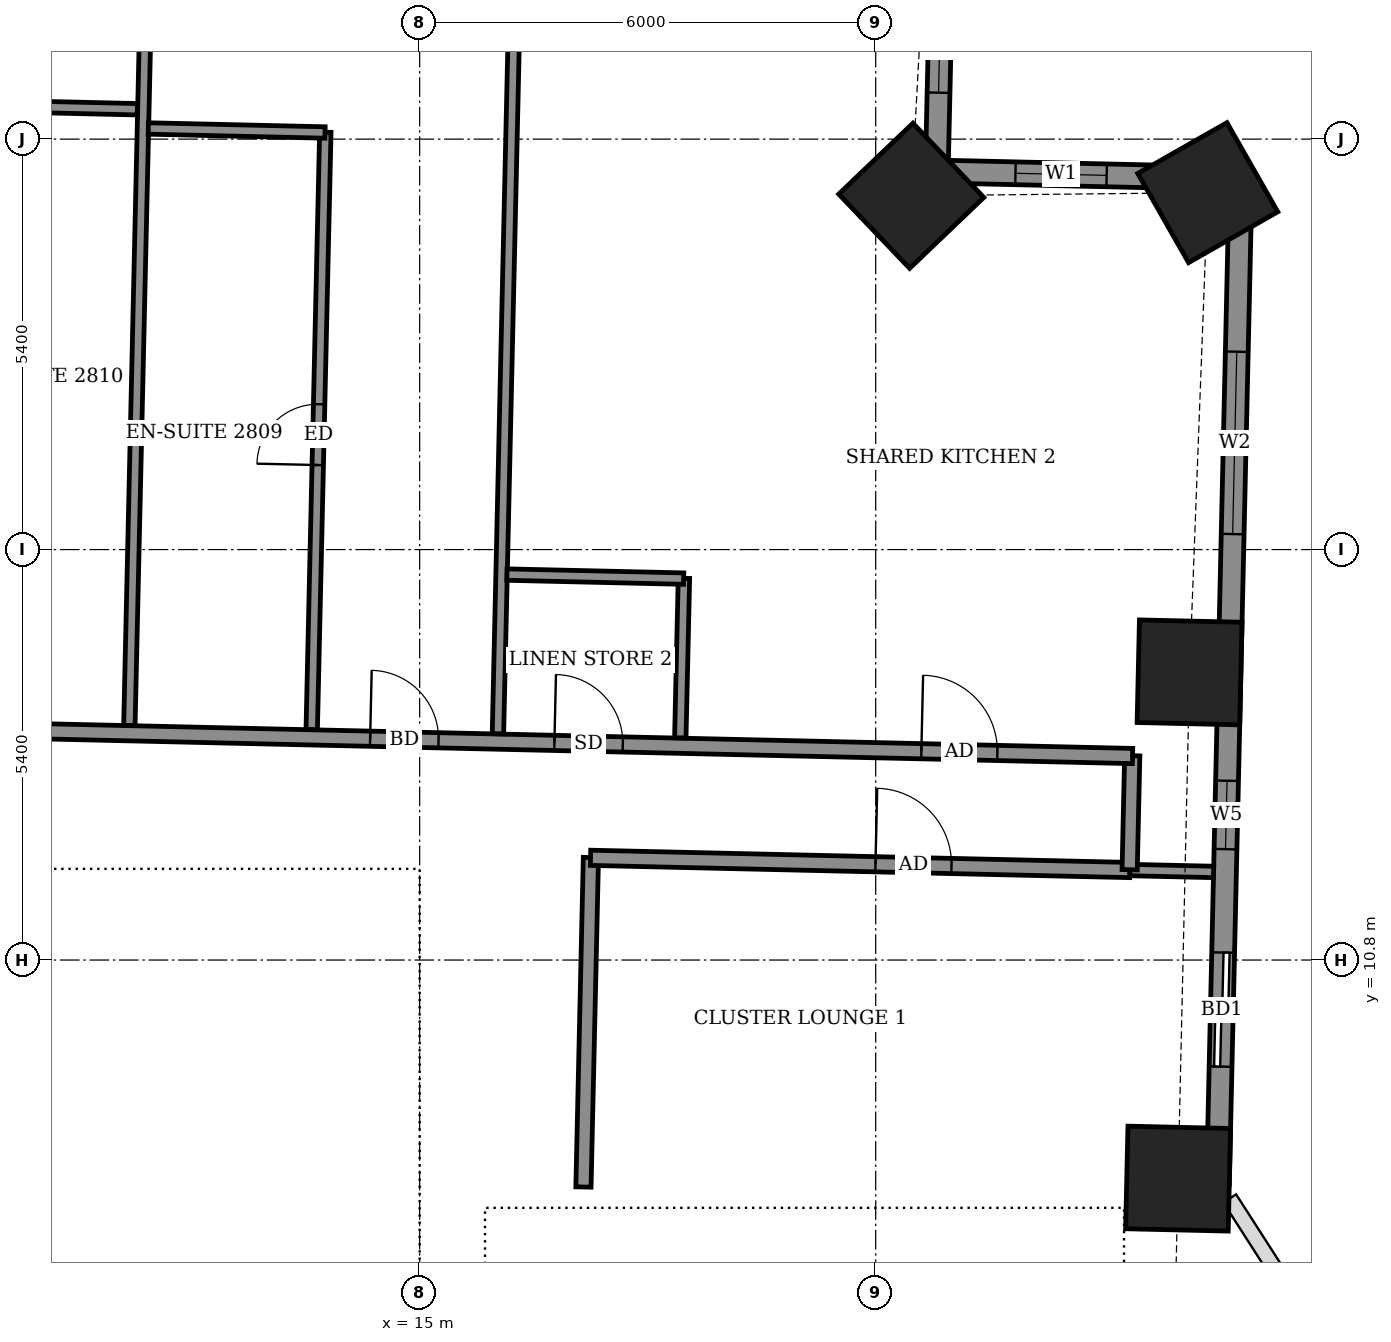
"""IFC4 building model, lengths in metres.
Left out: names, types, materials, properties, quantities, classifications, styles, units other than length and angle.
Written with IfcOpenShell. Run it as: python <this file> out.ifc"""

import sys

from ifc_helpers import new_model, si_unit, direction, frame, frame_2d, origin, origin_2d, place, context, subcontext, project, spatial, rectangle, extrude, element, fill, save


model = new_model("IFC4")
c1 = context("Model", 3, precision=1e-05, world=origin(), true_north=direction((0.0, 1.0)))
c2 = subcontext(c1, "Body", "Model", "MODEL_VIEW")
j1 = project(units=[si_unit("LENGTHUNIT", "METRE"), si_unit("PLANEANGLEUNIT", "RADIAN")], contexts=[c1])
p1 = place(None, origin())
s1 = spatial("IfcSite", under=j1, at=p1, CompositionType="ELEMENT")
p2 = place(p1, origin())
s2 = spatial("IfcBuilding", under=s1, at=p2, CompositionType="ELEMENT")
p3 = place(p2, frame((0.0, 0.0, 112.7)))
s3 = spatial("IfcBuildingStorey", under=s2, at=p3, CompositionType="ELEMENT", Elevation=112.7)
for number, where, z_axis, x_axis in (
    (1, (24.978, 7.924, -0.55), (0.0, 0.0, 1.0), (0.023, 1.0, 0.0)),
    (2, (25.129, 14.584, -0.55), (0.0, 0.0, 1.0), (0.023, 1.0, 0.0)),
    (3, (25.369, 20.896, -0.55), (0.0, 0.0, 1.0), (-0.495, 0.869, 0.0)),
    (4, (21.468, 20.855, -0.55), (0.0, 0.0, 1.0), (-0.691, 0.723, 0.0)),
):
    element("IfcColumn", number, at=place(p3, frame(where, z_axis=z_axis, x_axis=x_axis)), inside=s3, PredefinedType="COLUMN", context=c2, shape_type="SweptSolid", body=[
        extrude(rectangle(XDim=1.35, YDim=1.35, at=origin_2d()), origin(), (0.0, 0.0, 1.0), 3.6),
    ])
p4 = place(p3, frame((25.502, 7.857, 0.0), z_axis=(0.0, 0.0, 1.0), x_axis=(0.022680323815, 0.999742768372, 0.0)))
e5 = element("IfcWall", 5, at=p4, inside=s3, PredefinedType="SOLIDWALL", context=c2, shape_type="SweptSolid", body=[
    extrude(rectangle(XDim=13.229, YDim=0.3, at=frame_2d((6.615, 0.0))), origin(), (0.0, 0.0, 1.0), 3.05),
])
p5 = place(p4, frame((1.542, 0.0, 0.0)))
e6 = element("IfcOpeningElement", 6, at=p5, cuts=e5, PredefinedType="OPENING", context=c2, shape_type="SweptSolid", body=[
    extrude(rectangle(XDim=1.5, YDim=2.4, at=frame_2d((0.75, 1.2))), frame((0.0, 0.16, 0.0), z_axis=(0.0, -1.0, 0.0), x_axis=(1.0, 0.0, 0.0)), (0.0, 0.0, 1.0), 0.32),
])
p6 = place(p4, frame((4.403, 0.0, 0.9)))
e7 = element("IfcOpeningElement", 7, at=p6, cuts=e5, PredefinedType="OPENING", context=c2, shape_type="SweptSolid", body=[
    extrude(rectangle(XDim=0.9, YDim=1.5, at=frame_2d((0.45, 0.75))), frame((0.0, 0.16, 0.0), z_axis=(0.0, -1.0, 0.0), x_axis=(1.0, 0.0, 0.0)), (0.0, 0.0, 1.0), 0.32),
])
p7 = place(p4, frame((8.549, 0.0, 0.9)))
e8 = element("IfcOpeningElement", 8, at=p7, cuts=e5, PredefinedType="OPENING", context=c2, shape_type="SweptSolid", body=[
    extrude(rectangle(XDim=2.4, YDim=1.5, at=frame_2d((1.2, 0.75))), frame((0.0, 0.16, 0.0), z_axis=(0.0, -1.0, 0.0), x_axis=(1.0, 0.0, 0.0)), (0.0, 0.0, 1.0), 0.32),
])
p8 = place(p3, frame((25.802, 21.083, 0.0), z_axis=(0.0, 0.0, 1.0), x_axis=(-0.999740826251, 0.022765770952, 0.0)))
e9 = element("IfcWall", 9, at=p8, inside=s3, PredefinedType="SOLIDWALL", context=c2, shape_type="SweptSolid", body=[
    extrude(rectangle(XDim=4.0, YDim=0.3, at=frame_2d((2.0, 0.0))), origin(), (0.0, 0.0, 1.0), 2.55),
])
p9 = place(p8, frame((1.764, 0.0, 0.9)))
e10 = element("IfcOpeningElement", 10, at=p9, cuts=e9, PredefinedType="OPENING", context=c2, shape_type="SweptSolid", body=[
    extrude(rectangle(XDim=1.2, YDim=1.5, at=frame_2d((0.6, 0.75))), frame((0.0, 0.16, 0.0), z_axis=(0.0, -1.0, 0.0), x_axis=(1.0, 0.0, 0.0)), (0.0, 0.0, 1.0), 0.32),
])
p10 = place(p3, frame((21.803, 21.174, 0.0), z_axis=(0.0, 0.0, 1.0), x_axis=(0.022765770952, 0.999740826251, 0.0)))
e11 = element("IfcWall", 11, at=p10, inside=s3, PredefinedType="SOLIDWALL", context=c2, shape_type="SweptSolid", body=[
    extrude(rectangle(XDim=4.0, YDim=0.3, at=frame_2d((2.0, 0.0))), origin(), (0.0, 0.0, 1.0), 2.55),
])
p11 = place(p10, frame((1.037, 0.0, 0.9)))
e12 = element("IfcOpeningElement", 12, at=p11, cuts=e11, PredefinedType="OPENING", context=c2, shape_type="SweptSolid", body=[
    extrude(rectangle(XDim=1.2, YDim=1.5, at=frame_2d((0.6, 0.75))), frame((0.0, 0.16, 0.0), z_axis=(0.0, -1.0, 0.0), x_axis=(1.0, 0.0, 0.0)), (0.0, 0.0, 1.0), 0.32),
])
p12 = place(p3, frame((17.155, 7.814, 0.0), z_axis=(0.0, 0.0, 1.0), x_axis=(0.022578158225, 0.999745080894, 0.0)))
e13 = element("IfcWall", 13, at=p12, inside=s3, PredefinedType="PARTITIONING", context=c2, shape_type="SweptSolid", body=[
    extrude(rectangle(XDim=4.336, YDim=0.2, at=frame_2d((2.168, 0.0))), origin(), (0.0, 0.0, 1.0), 3.05),
])
p13 = place(p3, frame((17.248, 12.145, 0.0), z_axis=(0.0, 0.0, 1.0), x_axis=(0.999742350192, -0.022698749566, 0.0)))
e14 = element("IfcWall", 14, at=p13, inside=s3, PredefinedType="PARTITIONING", context=c2, shape_type="SweptSolid", body=[
    extrude(rectangle(XDim=7.099, YDim=0.2, at=frame_2d((3.549, 0.0))), origin(), (0.0, 0.0, 1.0), 3.05),
])
p14 = place(p13, frame((3.75, 0.0, 0.0)))
e15 = element("IfcOpeningElement", 15, at=p14, cuts=e14, PredefinedType="OPENING", context=c2, shape_type="SweptSolid", body=[
    extrude(rectangle(XDim=1.0, YDim=2.1, at=frame_2d((0.5, 1.05))), frame((0.0, 0.11, 0.0), z_axis=(0.0, -1.0, 0.0), x_axis=(1.0, 0.0, 0.0)), (0.0, 0.0, 1.0), 0.22),
])
p15 = place(p3, frame((24.345, 11.984, 0.0), z_axis=(0.0, 0.0, 1.0), x_axis=(0.9997438932, -0.022630687329, 0.0)))
e16 = element("IfcWall", 16, at=p15, inside=s3, PredefinedType="PARTITIONING", context=c2, shape_type="SweptSolid", body=[
    extrude(rectangle(XDim=1.1, YDim=0.15, at=frame_2d((0.55, 0.0))), origin(), (0.0, 0.0, 1.0), 2.55),
])
p16 = place(p3, frame((24.341, 11.988, 0.0), z_axis=(0.0, 0.0, 1.0), x_axis=(0.022617910375, 0.999744182344, 0.0)))
e17 = element("IfcWall", 17, at=p16, inside=s3, PredefinedType="PARTITIONING", context=c2, shape_type="SweptSolid", body=[
    extrude(rectangle(XDim=1.5, YDim=0.2, at=frame_2d((0.75, 0.0))), origin(), (0.0, 0.0, 1.0), 3.05),
])
p17 = place(p3, frame((-26.341, 14.635, 0.0), z_axis=(0.0, 0.0, 1.0), x_axis=(0.999742553034, -0.02268981385, 0.0)))
e18 = element("IfcWall", 18, at=p17, inside=s3, PredefinedType="PARTITIONING", context=c2, shape_type="SweptSolid", body=[
    extrude(rectangle(XDim=50.733, YDim=0.2, at=frame_2d((25.366, 0.0))), origin(), (0.0, 0.0, 1.0), 3.05),
])
p18 = place(p17, frame((47.954, 0.0, 0.0)))
e19 = element("IfcOpeningElement", 19, at=p18, cuts=e18, PredefinedType="OPENING", context=c2, shape_type="SweptSolid", body=[
    extrude(rectangle(XDim=1.0, YDim=2.1, at=frame_2d((0.5, 1.05))), frame((0.0, 0.11, 0.0), z_axis=(0.0, -1.0, 0.0), x_axis=(1.0, 0.0, 0.0)), (0.0, 0.0, 1.0), 0.22),
])
p19 = place(p17, frame((43.125, 0.0, 0.0)))
e20 = element("IfcOpeningElement", 20, at=p19, cuts=e18, PredefinedType="OPENING", context=c2, shape_type="SweptSolid", body=[
    extrude(rectangle(XDim=0.9, YDim=2.1, at=frame_2d((0.45, 1.05))), frame((0.0, 0.11, 0.0), z_axis=(0.0, -1.0, 0.0), x_axis=(1.0, 0.0, 0.0)), (0.0, 0.0, 1.0), 0.22),
])
p20 = place(p17, frame((40.7, 0.0, 0.0)))
e21 = element("IfcOpeningElement", 21, at=p20, cuts=e18, PredefinedType="OPENING", context=c2, shape_type="SweptSolid", body=[
    extrude(rectangle(XDim=0.9, YDim=2.1, at=frame_2d((0.45, 1.05))), frame((0.0, 0.11, 0.0), z_axis=(0.0, -1.0, 0.0), x_axis=(1.0, 0.0, 0.0)), (0.0, 0.0, 1.0), 0.22),
])
p21 = place(p17, frame((33.425, 0.0, 0.0)))
e22 = element("IfcOpeningElement", 22, at=p21, cuts=e18, PredefinedType="OPENING", context=c2, shape_type="SweptSolid", body=[
    extrude(rectangle(XDim=0.9, YDim=2.1, at=frame_2d((0.45, 1.05))), frame((0.0, 0.11, 0.0), z_axis=(0.0, -1.0, 0.0), x_axis=(1.0, 0.0, 0.0)), (0.0, 0.0, 1.0), 0.22),
])
p22 = place(p17, frame((30.95, 0.0, 0.0)))
e23 = element("IfcOpeningElement", 23, at=p22, cuts=e18, PredefinedType="OPENING", context=c2, shape_type="SweptSolid", body=[
    extrude(rectangle(XDim=0.9, YDim=2.1, at=frame_2d((0.45, 1.05))), frame((0.0, 0.11, 0.0), z_axis=(0.0, -1.0, 0.0), x_axis=(1.0, 0.0, 0.0)), (0.0, 0.0, 1.0), 0.22),
])
p23 = place(p17, frame((23.675, 0.0, 0.0)))
e24 = element("IfcOpeningElement", 24, at=p23, cuts=e18, PredefinedType="OPENING", context=c2, shape_type="SweptSolid", body=[
    extrude(rectangle(XDim=0.9, YDim=2.1, at=frame_2d((0.45, 1.05))), frame((0.0, 0.11, 0.0), z_axis=(0.0, -1.0, 0.0), x_axis=(1.0, 0.0, 0.0)), (0.0, 0.0, 1.0), 0.22),
])
p24 = place(p17, frame((21.2, 0.0, 0.0)))
e25 = element("IfcOpeningElement", 25, at=p24, cuts=e18, PredefinedType="OPENING", context=c2, shape_type="SweptSolid", body=[
    extrude(rectangle(XDim=0.9, YDim=2.1, at=frame_2d((0.45, 1.05))), frame((0.0, 0.11, 0.0), z_axis=(0.0, -1.0, 0.0), x_axis=(1.0, 0.0, 0.0)), (0.0, 0.0, 1.0), 0.22),
])
p25 = place(p17, frame((13.95, 0.0, 0.0)))
e26 = element("IfcOpeningElement", 26, at=p25, cuts=e18, PredefinedType="OPENING", context=c2, shape_type="SweptSolid", body=[
    extrude(rectangle(XDim=0.9, YDim=2.1, at=frame_2d((0.45, 1.05))), frame((0.0, 0.11, 0.0), z_axis=(0.0, -1.0, 0.0), x_axis=(1.0, 0.0, 0.0)), (0.0, 0.0, 1.0), 0.22),
])
p26 = place(p17, frame((11.475, 0.0, 0.0)))
e27 = element("IfcOpeningElement", 27, at=p26, cuts=e18, PredefinedType="OPENING", context=c2, shape_type="SweptSolid", body=[
    extrude(rectangle(XDim=0.9, YDim=2.1, at=frame_2d((0.45, 1.05))), frame((0.0, 0.11, 0.0), z_axis=(0.0, -1.0, 0.0), x_axis=(1.0, 0.0, 0.0)), (0.0, 0.0, 1.0), 0.22),
])
p27 = place(p17, frame((1.4, 0.0, 0.0)))
e28 = element("IfcOpeningElement", 28, at=p27, cuts=e18, PredefinedType="OPENING", context=c2, shape_type="SweptSolid", body=[
    extrude(rectangle(XDim=1.0, YDim=2.1, at=frame_2d((0.5, 1.05))), frame((0.0, 0.11, 0.0), z_axis=(0.0, -1.0, 0.0), x_axis=(1.0, 0.0, 0.0)), (0.0, 0.0, 1.0), 0.22),
])
p28 = place(p17, frame((6.625, 0.0, 0.0)))
e29 = element("IfcOpeningElement", 29, at=p28, cuts=e18, PredefinedType="OPENING", context=c2, shape_type="SweptSolid", body=[
    extrude(rectangle(XDim=0.9, YDim=2.1, at=frame_2d((0.45, 1.05))), frame((0.0, 0.11, 0.0), z_axis=(0.0, -1.0, 0.0), x_axis=(1.0, 0.0, 0.0)), (0.0, 0.0, 1.0), 0.22),
])
p29 = place(p3, frame((11.181, 13.887, 0.0), z_axis=(0.0, 0.0, 1.0), x_axis=(0.022707631257, 0.999742148498, 0.0)))
e30 = element("IfcWall", 30, at=p29, inside=s3, PredefinedType="PARTITIONING", context=c2, shape_type="SweptSolid", body=[
    extrude(rectangle(XDim=11.676, YDim=0.15, at=frame_2d((5.838, 0.0))), origin(), (0.0, 0.0, 1.0), 2.55),
])
p30 = place(p3, frame((13.58, 13.833, 0.0), z_axis=(0.0, 0.0, 1.0), x_axis=(0.022767973308, 0.999740776097, 0.0)))
e31 = element("IfcWall", 31, at=p30, inside=s3, PredefinedType="PARTITIONING", context=c2, shape_type="SweptSolid", body=[
    extrude(rectangle(XDim=7.86, YDim=0.15, at=frame_2d((3.93, 0.0))), origin(), (0.0, 0.0, 1.0), 3.05),
])
p31 = place(p30, frame((3.48, 0.0, 0.0)))
e32 = element("IfcOpeningElement", 32, at=p31, cuts=e31, PredefinedType="OPENING", context=c2, shape_type="SweptSolid", body=[
    extrude(rectangle(XDim=0.8, YDim=2.1, at=frame_2d((0.4, 1.05))), frame((0.0, 0.085, 0.0), z_axis=(0.0, -1.0, 0.0), x_axis=(1.0, 0.0, 0.0)), (0.0, 0.0, 1.0), 0.17),
])
p32 = place(p3, frame((16.03, 13.777, 0.0), z_axis=(0.0, 0.0, 1.0), x_axis=(0.022687206857, 0.999742612198, 0.0)))
e33 = element("IfcWall", 33, at=p32, inside=s3, PredefinedType="PARTITIONING", context=c2, shape_type="SweptSolid", body=[
    extrude(rectangle(XDim=11.676, YDim=0.15, at=frame_2d((5.838, 0.0))), origin(), (0.0, 0.0, 1.0), 2.55),
])
p33 = place(p3, frame((18.429, 13.723, 0.0), z_axis=(0.0, 0.0, 1.0), x_axis=(0.022906293375, 0.999737616439, 0.0)))
e34 = element("IfcWall", 34, at=p33, inside=s3, PredefinedType="PARTITIONING", context=c2, shape_type="SweptSolid", body=[
    extrude(rectangle(XDim=2.1, YDim=0.15, at=frame_2d((1.05, 0.0))), origin(), (0.0, 0.0, 1.0), 3.05),
])
for number, where, z_axis, x_axis in (
    (35, (16.148, 15.871, 0.0), (0.0, 0.0, 1.0), (1.0, -0.023, 0.0)),
    (36, (11.43, 21.74, 0.0), (0.0, 0.0, 1.0), (1.0, -0.023, 0.0)),
    (37, (8.961, 22.046, 0.0), (0.0, 0.0, 1.0), (1.0, -0.023, 0.0)),
):
    element("IfcWall", number, at=place(p3, frame(where, z_axis=z_axis, x_axis=x_axis)), inside=s3, PredefinedType="PARTITIONING", context=c2, shape_type="SweptSolid", body=[
        extrude(rectangle(XDim=2.325, YDim=0.15, at=frame_2d((1.163, 0.0))), origin(), (0.0, 0.0, 1.0), 3.05),
    ])
p34 = place(p3, frame((-14.8, 11.3, 0.0), z_axis=(0.0, 0.0, 1.0), x_axis=(1.0, 0.0, 0.0)))
e38 = element("IfcWall", 38, at=p34, inside=s3, PredefinedType="SHEAR", context=c2, shape_type="SweptSolid", body=[
    extrude(rectangle(XDim=29.6, YDim=1.0, at=frame_2d((14.8, 0.0))), origin(), (0.0, 0.0, 1.0), 3.6),
])
p35 = place(p3, frame((14.3, -10.8, 0.0), z_axis=(0.0, 0.0, 1.0), x_axis=(0.0, 1.0, 0.0)))
e39 = element("IfcWall", 39, at=p35, inside=s3, PredefinedType="SHEAR", context=c2, shape_type="SweptSolid", body=[
    extrude(rectangle(XDim=21.6, YDim=1.0, at=frame_2d((10.8, 0.0))), origin(), (0.0, 0.0, 1.0), 3.6),
])
p36 = place(p35, frame((1.2, 0.0, 0.0)))
e40 = element("IfcOpeningElement", 40, at=p36, cuts=e39, PredefinedType="OPENING", context=c2, shape_type="SweptSolid", body=[
    extrude(rectangle(XDim=1.2, YDim=2.1, at=frame_2d((0.6, 1.05))), frame((0.0, 0.51, 0.0), z_axis=(0.0, -1.0, 0.0), x_axis=(1.0, 0.0, 0.0)), (0.0, 0.0, 1.0), 1.02),
])
p37 = place(p3, frame((-10.9, 8.1, 0.0), z_axis=(0.0, 0.0, 1.0), x_axis=(1.0, 0.0, 0.0)))
e41 = element("IfcWall", 41, at=p37, inside=s3, PredefinedType="SHEAR", context=c2, shape_type="SweptSolid", body=[
    extrude(rectangle(XDim=21.8, YDim=0.2, at=frame_2d((10.9, 0.0))), origin(), (0.0, 0.0, 1.0), 3.05),
])
p38 = place(p37, frame((0.9, 0.0, 0.0)))
e42 = element("IfcOpeningElement", 42, at=p38, cuts=e41, PredefinedType="OPENING", context=c2, shape_type="SweptSolid", body=[
    extrude(rectangle(XDim=1.1, YDim=2.1, at=frame_2d((0.55, 1.05))), frame((0.0, 0.11, 0.0), z_axis=(0.0, -1.0, 0.0), x_axis=(1.0, 0.0, 0.0)), (0.0, 0.0, 1.0), 0.22),
])
p39 = place(p37, frame((3.6, 0.0, 0.0)))
e43 = element("IfcOpeningElement", 43, at=p39, cuts=e41, PredefinedType="OPENING", context=c2, shape_type="SweptSolid", body=[
    extrude(rectangle(XDim=1.1, YDim=2.1, at=frame_2d((0.55, 1.05))), frame((0.0, 0.11, 0.0), z_axis=(0.0, -1.0, 0.0), x_axis=(1.0, 0.0, 0.0)), (0.0, 0.0, 1.0), 0.22),
])
p40 = place(p37, frame((6.3, 0.0, 0.0)))
e44 = element("IfcOpeningElement", 44, at=p40, cuts=e41, PredefinedType="OPENING", context=c2, shape_type="SweptSolid", body=[
    extrude(rectangle(XDim=1.1, YDim=2.1, at=frame_2d((0.55, 1.05))), frame((0.0, 0.11, 0.0), z_axis=(0.0, -1.0, 0.0), x_axis=(1.0, 0.0, 0.0)), (0.0, 0.0, 1.0), 0.22),
])
p41 = place(p37, frame((9.0, 0.0, 0.0)))
e45 = element("IfcOpeningElement", 45, at=p41, cuts=e41, PredefinedType="OPENING", context=c2, shape_type="SweptSolid", body=[
    extrude(rectangle(XDim=1.1, YDim=2.1, at=frame_2d((0.55, 1.05))), frame((0.0, 0.11, 0.0), z_axis=(0.0, -1.0, 0.0), x_axis=(1.0, 0.0, 0.0)), (0.0, 0.0, 1.0), 0.22),
])
p42 = place(p37, frame((11.7, 0.0, 0.0)))
e46 = element("IfcOpeningElement", 46, at=p42, cuts=e41, PredefinedType="OPENING", context=c2, shape_type="SweptSolid", body=[
    extrude(rectangle(XDim=1.1, YDim=2.1, at=frame_2d((0.55, 1.05))), frame((0.0, 0.11, 0.0), z_axis=(0.0, -1.0, 0.0), x_axis=(1.0, 0.0, 0.0)), (0.0, 0.0, 1.0), 0.22),
])
p43 = place(p37, frame((14.5, 0.0, 0.0)))
e47 = element("IfcOpeningElement", 47, at=p43, cuts=e41, PredefinedType="OPENING", context=c2, shape_type="SweptSolid", body=[
    extrude(rectangle(XDim=0.9, YDim=2.1, at=frame_2d((0.45, 1.05))), frame((0.0, 0.11, 0.0), z_axis=(0.0, -1.0, 0.0), x_axis=(1.0, 0.0, 0.0)), (0.0, 0.0, 1.0), 0.22),
])
p44 = place(p37, frame((18.55, 0.0, 0.0)))
e48 = element("IfcOpeningElement", 48, at=p44, cuts=e41, PredefinedType="OPENING", context=c2, shape_type="SweptSolid", body=[
    extrude(rectangle(XDim=0.9, YDim=2.1, at=frame_2d((0.45, 1.05))), frame((0.0, 0.11, 0.0), z_axis=(0.0, -1.0, 0.0), x_axis=(1.0, 0.0, 0.0)), (0.0, 0.0, 1.0), 0.22),
])
p45 = place(p3, frame((10.8, 8.2, 0.0), z_axis=(0.0, 0.0, 1.0), x_axis=(0.0, 1.0, 0.0)))
e49 = element("IfcWall", 49, at=p45, inside=s3, PredefinedType="STANDARD", context=c2, shape_type="SweptSolid", body=[
    extrude(rectangle(XDim=2.6, YDim=0.2, at=frame_2d((1.3, 0.0))), origin(), (0.0, 0.0, 1.0), 3.05),
])
p46 = place(p5, origin())
e50 = element("IfcDoor", 50, at=p46, inside=s3, OperationType="SLIDING_TO_LEFT", PredefinedType="DOOR", context=c2, shape_type="SweptSolid", body=[
    extrude(rectangle(XDim=1.5, YDim=2.4, at=frame_2d((0.75, 1.2))), frame((0.0, 0.025, 0.0), z_axis=(0.0, -1.0, 0.0), x_axis=(1.0, 0.0, 0.0)), (0.0, 0.0, 1.0), 0.05),
])
fill(e6, e50)
p47 = place(p6, origin())
e51 = element("IfcWindow", 51, at=p47, inside=s3, PartitioningType="SINGLE_PANEL", PredefinedType="WINDOW", context=c2, shape_type="SweptSolid", body=[
    extrude(rectangle(XDim=0.9, YDim=1.5, at=frame_2d((0.45, 0.75))), frame((0.0, 0.03, 0.0), z_axis=(0.0, -1.0, 0.0), x_axis=(1.0, 0.0, 0.0)), (0.0, 0.0, 1.0), 0.06),
])
fill(e7, e51)
p48 = place(p7, origin())
e52 = element("IfcWindow", 52, at=p48, inside=s3, PartitioningType="DOUBLE_PANEL_VERTICAL", PredefinedType="WINDOW", context=c2, shape_type="SweptSolid", body=[
    extrude(rectangle(XDim=2.4, YDim=1.5, at=frame_2d((1.2, 0.75))), frame((0.0, 0.03, 0.0), z_axis=(0.0, -1.0, 0.0), x_axis=(1.0, 0.0, 0.0)), (0.0, 0.0, 1.0), 0.06),
])
fill(e8, e52)
p49 = place(p9, origin())
e53 = element("IfcWindow", 53, at=p49, inside=s3, PartitioningType="SINGLE_PANEL", PredefinedType="WINDOW", context=c2, shape_type="SweptSolid", body=[
    extrude(rectangle(XDim=1.2, YDim=1.5, at=frame_2d((0.6, 0.75))), frame((0.0, 0.03, 0.0), z_axis=(0.0, -1.0, 0.0), x_axis=(1.0, 0.0, 0.0)), (0.0, 0.0, 1.0), 0.06),
])
fill(e10, e53)
p50 = place(p11, origin())
e54 = element("IfcWindow", 54, at=p50, inside=s3, PartitioningType="SINGLE_PANEL", PredefinedType="WINDOW", context=c2, shape_type="SweptSolid", body=[
    extrude(rectangle(XDim=1.2, YDim=1.5, at=frame_2d((0.6, 0.75))), frame((0.0, 0.03, 0.0), z_axis=(0.0, -1.0, 0.0), x_axis=(1.0, 0.0, 0.0)), (0.0, 0.0, 1.0), 0.06),
])
fill(e12, e54)
p51 = place(p14, origin())
e55 = element("IfcDoor", 55, at=p51, inside=s3, OperationType="SINGLE_SWING_RIGHT", PredefinedType="DOOR", context=c2, shape_type="SweptSolid", body=[
    extrude(rectangle(XDim=1.0, YDim=2.1, at=frame_2d((0.5, 1.05))), frame((0.0, 0.025, 0.0), z_axis=(0.0, -1.0, 0.0), x_axis=(1.0, 0.0, 0.0)), (0.0, 0.0, 1.0), 0.05),
])
fill(e15, e55)
p52 = place(p18, origin())
e56 = element("IfcDoor", 56, at=p52, inside=s3, OperationType="SINGLE_SWING_LEFT", PredefinedType="DOOR", context=c2, shape_type="SweptSolid", body=[
    extrude(rectangle(XDim=1.0, YDim=2.1, at=frame_2d((0.5, 1.05))), frame((0.0, 0.025, 0.0), z_axis=(0.0, -1.0, 0.0), x_axis=(1.0, 0.0, 0.0)), (0.0, 0.0, 1.0), 0.05),
])
fill(e19, e56)
p53 = place(p19, origin())
e57 = element("IfcDoor", 57, at=p53, inside=s3, OperationType="SINGLE_SWING_RIGHT", PredefinedType="DOOR", context=c2, shape_type="SweptSolid", body=[
    extrude(rectangle(XDim=0.9, YDim=2.1, at=frame_2d((0.45, 1.05))), frame((0.0, 0.025, 0.0), z_axis=(0.0, -1.0, 0.0), x_axis=(1.0, 0.0, 0.0)), (0.0, 0.0, 1.0), 0.05),
])
fill(e20, e57)
p54 = place(p20, origin())
e58 = element("IfcDoor", 58, at=p54, inside=s3, OperationType="SINGLE_SWING_LEFT", PredefinedType="DOOR", context=c2, shape_type="SweptSolid", body=[
    extrude(rectangle(XDim=0.9, YDim=2.1, at=frame_2d((0.45, 1.05))), frame((0.0, 0.025, 0.0), z_axis=(0.0, -1.0, 0.0), x_axis=(1.0, 0.0, 0.0)), (0.0, 0.0, 1.0), 0.05),
])
fill(e21, e58)
p55 = place(p31, origin())
e59 = element("IfcDoor", 59, at=p55, inside=s3, OperationType="SINGLE_SWING_LEFT", PredefinedType="DOOR", context=c2, shape_type="SweptSolid", body=[
    extrude(rectangle(XDim=0.8, YDim=2.1, at=frame_2d((0.4, 1.05))), frame((0.0, 0.025, 0.0), z_axis=(0.0, -1.0, 0.0), x_axis=(1.0, 0.0, 0.0)), (0.0, 0.0, 1.0), 0.05),
])
fill(e32, e59)
save(model, sys.argv[1])
